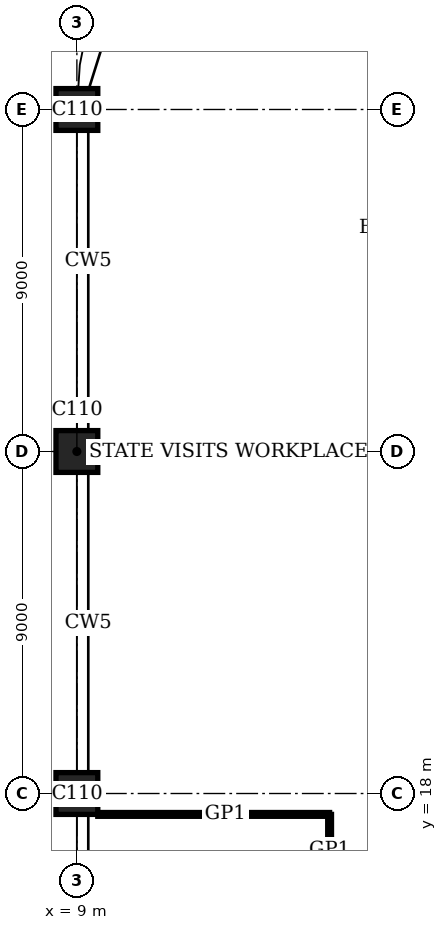
"""IFC4 building model, lengths in metres.
Left out: names, types, materials, properties, quantities, classifications, styles, units other than length and angle.
Written with IfcOpenShell. Run it as: python <this file> out.ifc"""

import sys

from ifc_helpers import new_model, si_unit, direction, frame, frame_2d, origin, origin_2d, place, context, subcontext, project, spatial, rectangle, extrude, element, save


model = new_model("IFC4")
c1 = context("Model", 3, precision=1e-05, world=origin(), true_north=direction((0.0, 1.0)))
c2 = subcontext(c1, "Body", "Model", "MODEL_VIEW")
j1 = project(units=[si_unit("LENGTHUNIT", "METRE"), si_unit("PLANEANGLEUNIT", "RADIAN")], contexts=[c1])
p1 = place(None, origin())
s1 = spatial("IfcSite", under=j1, at=p1, CompositionType="ELEMENT")
p2 = place(p1, origin())
s2 = spatial("IfcBuilding", under=s1, at=p2, CompositionType="ELEMENT")
p3 = place(p2, frame((0.0, 0.0, 279.4)))
s3 = spatial("IfcBuildingStorey", under=s2, at=p3, CompositionType="ELEMENT", Elevation=279.4)
for number, where, z_axis, x_axis in (
    (1, (9.0, 18.0, 0.0), (0.0, 0.0, 1.0), (1.0, 0.0, 0.0)),
    (2, (9.0, 27.0, 0.0), (0.0, 0.0, 1.0), (1.0, 0.0, 0.0)),
    (3, (9.0, 36.0, 0.0), (0.0, 0.0, 1.0), (1.0, 0.0, 0.0)),
):
    element("IfcColumn", number, at=place(p3, frame(where, z_axis=z_axis, x_axis=x_axis)), inside=s3, PredefinedType="COLUMN", context=c2, shape_type="SweptSolid", body=[
        extrude(rectangle(XDim=1.1, YDim=1.1, at=origin_2d()), origin(), (0.0, 0.0, 1.0), 4.0),
    ])
p4 = place(p3, frame((9.55, 17.45, 0.0), z_axis=(0.0, 0.0, 1.0), x_axis=(1.0, 0.0, 0.0)))
e4 = element("IfcWall", 4, at=p4, inside=s3, PredefinedType="PARTITIONING", context=c2, shape_type="SweptSolid", body=[
    extrude(rectangle(XDim=6.1, YDim=0.1, at=frame_2d((3.05, 0.0))), origin(), (0.0, 0.0, 1.0), 3.75),
])
p5 = place(p3, frame((15.65, 15.6, 0.0), z_axis=(0.0, 0.0, 1.0), x_axis=(0.0, 1.0, 0.0)))
e5 = element("IfcWall", 5, at=p5, inside=s3, PredefinedType="PARTITIONING", context=c2, shape_type="SweptSolid", body=[
    extrude(rectangle(XDim=1.85, YDim=0.1, at=frame_2d((0.925, 0.0))), origin(), (0.0, 0.0, 1.0), 3.75),
])
save(model, sys.argv[1])
